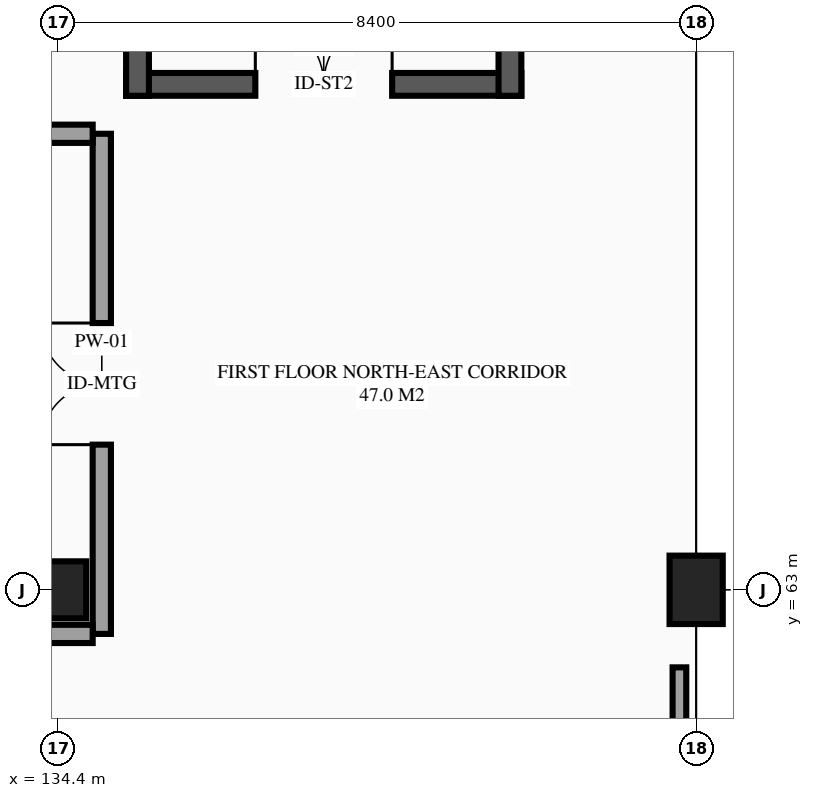
"""IFC4 building model, lengths in metres.
Left out: names, types, materials, properties, quantities, classifications, styles, units other than length and angle.
Written with IfcOpenShell. Run it as: python <this file> out.ifc"""

import sys

from ifc_helpers import new_model, si_unit, direction, frame, frame_2d, origin, origin_2d, place, context, subcontext, project, spatial, rectangle, extrude, element, fill, save


model = new_model("IFC4")
c1 = context("Model", 3, precision=1e-05, world=origin(), true_north=direction((0.0, 1.0)))
c2 = subcontext(c1, "Body", "Model", "MODEL_VIEW")
j1 = project(units=[si_unit("LENGTHUNIT", "METRE"), si_unit("PLANEANGLEUNIT", "RADIAN")], contexts=[c1])
p1 = place(None, origin())
s1 = spatial("IfcSite", under=j1, at=p1, CompositionType="ELEMENT")
p2 = place(p1, origin())
s2 = spatial("IfcBuilding", under=s1, at=p2, CompositionType="ELEMENT")
p3 = place(p2, frame((0.0, 0.0, 5.4)))
s3 = spatial("IfcBuildingStorey", under=s2, at=p3, CompositionType="ELEMENT", Elevation=5.4)
p4 = place(p3, frame((134.4, 63.0, 0.0), z_axis=(0.0, 0.0, 1.0), x_axis=(1.0, 0.0, 0.0)))
e1 = element("IfcColumn", 1, at=p4, inside=s3, PredefinedType="COLUMN", context=c2, shape_type="SweptSolid", body=[
    extrude(rectangle(XDim=0.75, YDim=0.75, at=origin_2d()), origin(), (0.0, 0.0, 1.0), 4.5),
])
p5 = place(p3, frame((142.8, 63.0, 0.0), z_axis=(0.0, 0.0, 1.0), x_axis=(1.0, 0.0, 0.0)))
e2 = element("IfcColumn", 2, at=p5, inside=s3, PredefinedType="COLUMN", context=c2, shape_type="SweptSolid", body=[
    extrude(rectangle(XDim=0.7, YDim=0.9, at=origin_2d()), origin(), (0.0, 0.0, 1.0), 4.5),
])
p6 = place(p3, frame((135.3, 69.65, 0.0), z_axis=(0.0, 0.0, 1.0), x_axis=(1.0, 0.0, 0.0)))
e3 = element("IfcWall", 3, at=p6, inside=s3, PredefinedType="SHEAR", context=c2, shape_type="SweptSolid", body=[
    extrude(rectangle(XDim=5.2, YDim=0.3, at=frame_2d((2.6, 0.0))), origin(), (0.0, 0.0, 1.0), 4.5),
])
p7 = place(p6, frame((1.7, 0.0, 0.0)))
e4 = element("IfcOpeningElement", 4, at=p7, cuts=e3, PredefinedType="OPENING", context=c2, shape_type="SweptSolid", body=[
    extrude(rectangle(XDim=1.8, YDim=2.2, at=frame_2d((0.9, 1.1))), frame((0.0, 0.16, 0.0), z_axis=(0.0, -1.0, 0.0), x_axis=(1.0, 0.0, 0.0)), (0.0, 0.0, 1.0), 0.32),
])
for number, where, z_axis, x_axis in (
    (5, (140.35, 69.5, 0.0), (0.0, 0.0, 1.0), (0.0, 1.0, 0.0)),
    (6, (135.45, 78.34, 0.0), (0.0, 0.0, 1.0), (0.0, -1.0, 0.0)),
):
    element("IfcWall", number, at=place(p3, frame(where, z_axis=z_axis, x_axis=x_axis)), inside=s3, PredefinedType="SHEAR", context=c2, shape_type="SweptSolid", body=[
        extrude(rectangle(XDim=8.84, YDim=0.3, at=frame_2d((4.42, 0.0))), origin(), (0.0, 0.0, 1.0), 4.5),
    ])
p8 = place(p3, frame((142.58, 38.11, 0.0), z_axis=(0.0, 0.0, 1.0), x_axis=(0.0, 1.0, 0.0)))
e7 = element("IfcWall", 7, at=p8, inside=s3, PredefinedType="PARTITIONING", context=c2, shape_type="SweptSolid", body=[
    extrude(rectangle(XDim=23.87, YDim=0.18, at=frame_2d((11.935, 0.0))), origin(), (0.0, 0.0, 1.0), 3.29),
])
p9 = place(p3, frame((134.98, 62.42, 0.0), z_axis=(0.0, 0.0, 1.0), x_axis=(0.0, 1.0, 0.0)))
e8 = element("IfcWall", 8, at=p9, inside=s3, PredefinedType="PARTITIONING", context=c2, shape_type="SweptSolid", body=[
    extrude(rectangle(XDim=6.58, YDim=0.24, at=frame_2d((3.29, 0.0))), origin(), (0.0, 0.0, 1.0), 4.235),
])
p10 = place(p9, frame((2.49, 0.0, 0.0)))
e9 = element("IfcOpeningElement", 9, at=p10, cuts=e8, PredefinedType="OPENING", context=c2, shape_type="SweptSolid", body=[
    extrude(rectangle(XDim=1.6, YDim=2.25, at=frame_2d((0.8, 1.125))), frame((0.0, 0.13, 0.0), z_axis=(0.0, -1.0, 0.0), x_axis=(1.0, 0.0, 0.0)), (0.0, 0.0, 1.0), 0.26),
])
p11 = place(p3, frame((126.17, 62.42, 0.0), z_axis=(0.0, 0.0, 1.0), x_axis=(1.0, 0.0, 0.0)))
e10 = element("IfcWall", 10, at=p11, inside=s3, PredefinedType="PARTITIONING", context=c2, shape_type="SweptSolid", body=[
    extrude(rectangle(XDim=8.69, YDim=0.24, at=frame_2d((4.345, 0.0))), origin(), (0.0, 0.0, 1.0), 4.235),
])
p12 = place(p3, frame((126.08, 69.0, 0.0), z_axis=(0.0, 0.0, 1.0), x_axis=(1.0, 0.0, 0.0)))
e11 = element("IfcWall", 11, at=p12, inside=s3, PredefinedType="PARTITIONING", context=c2, shape_type="SweptSolid", body=[
    extrude(rectangle(XDim=8.78, YDim=0.24, at=frame_2d((4.39, 0.0))), origin(), (0.0, 0.0, 1.0), 4.235),
])
p13 = place(p7, origin())
e12 = element("IfcDoor", 12, at=p13, inside=s3, OperationType="DOUBLE_DOOR_SINGLE_SWING", PredefinedType="DOOR", context=c2, shape_type="SweptSolid", body=[
    extrude(rectangle(XDim=1.8, YDim=2.2, at=frame_2d((0.9, 1.1))), frame((0.0, 0.025, 0.0), z_axis=(0.0, -1.0, 0.0), x_axis=(1.0, 0.0, 0.0)), (0.0, 0.0, 1.0), 0.05),
])
fill(e4, e12)
p14 = place(p10, origin())
e13 = element("IfcDoor", 13, at=p14, inside=s3, OperationType="DOUBLE_DOOR_SINGLE_SWING", PredefinedType="DOOR", context=c2, shape_type="SweptSolid", body=[
    extrude(rectangle(XDim=1.6, YDim=2.25, at=frame_2d((0.8, 1.125))), frame((0.0, 0.025, 0.0), z_axis=(0.0, -1.0, 0.0), x_axis=(1.0, 0.0, 0.0)), (0.0, 0.0, 1.0), 0.05),
])
fill(e9, e13)
save(model, sys.argv[1])
